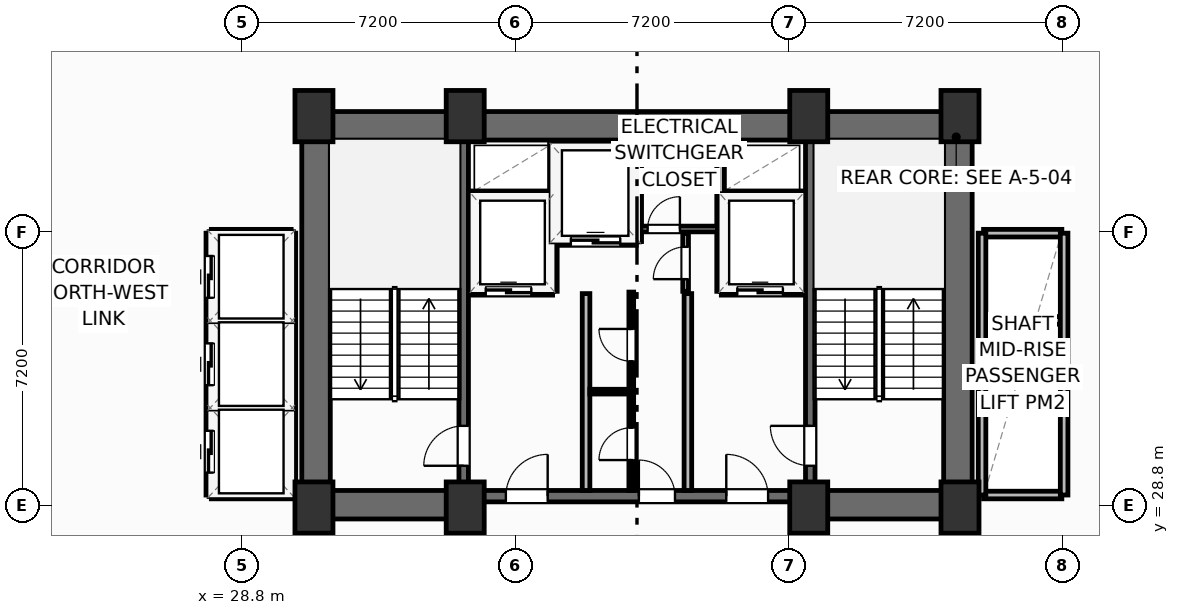
"""IFC4 building model, lengths in metres.
Left out: names, types, materials, properties, quantities, classifications, styles, units other than length and angle.
Written with IfcOpenShell. Run it as: python <this file> out.ifc"""

import sys

from ifc_helpers import new_model, si_unit, direction, frame, frame_2d, origin, origin_2d, place, context, subcontext, project, spatial, rectangle, extrude, element, fill, save


model = new_model("IFC4")
c1 = context("Model", 3, precision=1e-05, world=origin(), true_north=direction((0.0, 1.0)))
c2 = subcontext(c1, "Body", "Model", "MODEL_VIEW")
j1 = project(units=[si_unit("LENGTHUNIT", "METRE"), si_unit("PLANEANGLEUNIT", "RADIAN")], contexts=[c1])
p1 = place(None, origin())
s1 = spatial("IfcSite", under=j1, at=p1, CompositionType="ELEMENT")
p2 = place(p1, origin())
s2 = spatial("IfcBuilding", under=s1, at=p2, CompositionType="ELEMENT")
p3 = place(p2, frame((0.0, 0.0, 98.4)))
s3 = spatial("IfcBuildingStorey", under=s2, at=p3, CompositionType="ELEMENT", Elevation=98.4)
for number, where, z_axis, x_axis in (
    (1, (30.7, 28.75, 0.0), (0.0, 0.0, 1.0), (1.0, 0.0, 0.0)),
    (2, (34.68, 28.75, 0.0), (0.0, 0.0, 1.0), (1.0, 0.0, 0.0)),
    (3, (43.72, 28.75, 0.0), (0.0, 0.0, 1.0), (1.0, 0.0, 0.0)),
    (4, (47.7, 28.75, 0.0), (0.0, 0.0, 1.0), (1.0, 0.0, 0.0)),
    (5, (30.7, 39.05, 0.0), (0.0, 0.0, 1.0), (1.0, 0.0, 0.0)),
    (6, (34.68, 39.05, 0.0), (0.0, 0.0, 1.0), (1.0, 0.0, 0.0)),
    (7, (43.72, 39.05, 0.0), (0.0, 0.0, 1.0), (1.0, 0.0, 0.0)),
    (8, (47.7, 39.05, 0.0), (0.0, 0.0, 1.0), (1.0, 0.0, 0.0)),
):
    element("IfcColumn", number, at=place(p3, frame(where, z_axis=z_axis, x_axis=x_axis)), inside=s3, PredefinedType="COLUMN", context=c2, shape_type="SweptSolid", body=[
        extrude(rectangle(XDim=1.0, YDim=1.35, at=origin_2d()), origin(), (0.0, 0.0, 1.0), 3.7),
    ])
p4 = place(p3, frame((30.38, 38.795, 0.0), z_axis=(0.0, 0.0, 1.0), x_axis=(1.0, 0.0, 0.0)))
e9 = element("IfcWall", 9, at=p4, inside=s3, PredefinedType="SHEAR", context=c2, shape_type="SweptSolid", body=[
    extrude(rectangle(XDim=17.64, YDim=0.75, at=frame_2d((8.82, 0.0))), origin(), (0.0, 0.0, 1.0), 3.45),
])
for number, where, z_axis, x_axis in (
    (10, (30.755, 29.2, 0.0), (0.0, 0.0, 1.0), (0.0, 1.0, 0.0)),
    (11, (47.645, 29.2, 0.0), (0.0, 0.0, 1.0), (0.0, 1.0, 0.0)),
):
    element("IfcWall", number, at=place(p3, frame(where, z_axis=z_axis, x_axis=x_axis)), inside=s3, PredefinedType="SHEAR", context=c2, shape_type="SweptSolid", body=[
        extrude(rectangle(XDim=9.22, YDim=0.75, at=frame_2d((4.61, 0.0))), origin(), (0.0, 0.0, 1.0), 3.45),
    ])
p5 = place(p3, frame((30.38, 28.825, 0.0), z_axis=(0.0, 0.0, 1.0), x_axis=(1.0, 0.0, 0.0)))
e12 = element("IfcWall", 12, at=p5, inside=s3, PredefinedType="SHEAR", context=c2, shape_type="SweptSolid", body=[
    extrude(rectangle(XDim=4.42, YDim=0.75, at=frame_2d((2.21, 0.0))), origin(), (0.0, 0.0, 1.0), 3.45),
])
p6 = place(p3, frame((43.6, 28.825, 0.0), z_axis=(0.0, 0.0, 1.0), x_axis=(1.0, 0.0, 0.0)))
e13 = element("IfcWall", 13, at=p6, inside=s3, PredefinedType="SHEAR", context=c2, shape_type="SweptSolid", body=[
    extrude(rectangle(XDim=4.42, YDim=0.75, at=frame_2d((2.21, 0.0))), origin(), (0.0, 0.0, 1.0), 3.45),
])
p7 = place(p3, frame((34.8, 29.05, 0.0), z_axis=(0.0, 0.0, 1.0), x_axis=(1.0, 0.0, 0.0)))
e14 = element("IfcWall", 14, at=p7, inside=s3, PredefinedType="SHEAR", context=c2, shape_type="SweptSolid", body=[
    extrude(rectangle(XDim=8.8, YDim=0.3, at=frame_2d((4.4, 0.0))), origin(), (0.0, 0.0, 1.0), 3.45),
])
p8 = place(p7, frame((0.95, 0.0, 0.0)))
e15 = element("IfcOpeningElement", 15, at=p8, cuts=e14, PredefinedType="OPENING", context=c2, shape_type="SweptSolid", body=[
    extrude(rectangle(XDim=1.1, YDim=2.15, at=frame_2d((0.55, 1.075))), frame((0.0, 0.16, 0.0), z_axis=(0.0, -1.0, 0.0), x_axis=(1.0, 0.0, 0.0)), (0.0, 0.0, 1.0), 0.32),
])
p9 = place(p7, frame((6.75, 0.0, 0.0)))
e16 = element("IfcOpeningElement", 16, at=p9, cuts=e14, PredefinedType="OPENING", context=c2, shape_type="SweptSolid", body=[
    extrude(rectangle(XDim=1.1, YDim=2.15, at=frame_2d((0.55, 1.075))), frame((0.0, 0.16, 0.0), z_axis=(0.0, -1.0, 0.0), x_axis=(1.0, 0.0, 0.0)), (0.0, 0.0, 1.0), 0.32),
])
p10 = place(p7, frame((4.45, 0.0, 0.0)))
e17 = element("IfcOpeningElement", 17, at=p10, cuts=e14, PredefinedType="OPENING", context=c2, shape_type="SweptSolid", body=[
    extrude(rectangle(XDim=0.95, YDim=2.15, at=frame_2d((0.475, 1.075))), frame((0.0, 0.16, 0.0), z_axis=(0.0, -1.0, 0.0), x_axis=(1.0, 0.0, 0.0)), (0.0, 0.0, 1.0), 0.32),
])
p11 = place(p3, frame((34.64, 29.2, 0.0), z_axis=(0.0, 0.0, 1.0), x_axis=(0.0, 1.0, 0.0)))
e18 = element("IfcWall", 18, at=p11, inside=s3, PredefinedType="SHEAR", context=c2, shape_type="SweptSolid", body=[
    extrude(rectangle(XDim=9.22, YDim=0.25, at=frame_2d((4.61, 0.0))), origin(), (0.0, 0.0, 1.0), 3.45),
])
p12 = place(p11, frame((0.65, 0.0, 0.0)))
e19 = element("IfcOpeningElement", 19, at=p12, cuts=e18, PredefinedType="OPENING", context=c2, shape_type="SweptSolid", body=[
    extrude(rectangle(XDim=1.05, YDim=2.15, at=frame_2d((0.525, 1.075))), frame((0.0, 0.135, 0.0), z_axis=(0.0, -1.0, 0.0), x_axis=(1.0, 0.0, 0.0)), (0.0, 0.0, 1.0), 0.27),
])
p13 = place(p3, frame((43.76, 29.2, 0.0), z_axis=(0.0, 0.0, 1.0), x_axis=(0.0, 1.0, 0.0)))
e20 = element("IfcWall", 20, at=p13, inside=s3, PredefinedType="SHEAR", context=c2, shape_type="SweptSolid", body=[
    extrude(rectangle(XDim=9.22, YDim=0.25, at=frame_2d((4.61, 0.0))), origin(), (0.0, 0.0, 1.0), 3.45),
])
p14 = place(p13, frame((0.65, 0.0, 0.0)))
e21 = element("IfcOpeningElement", 21, at=p14, cuts=e20, PredefinedType="OPENING", context=c2, shape_type="SweptSolid", body=[
    extrude(rectangle(XDim=1.05, YDim=2.15, at=frame_2d((0.525, 1.075))), frame((0.0, 0.135, 0.0), z_axis=(0.0, -1.0, 0.0), x_axis=(1.0, 0.0, 0.0)), (0.0, 0.0, 1.0), 0.27),
])
for number, where, z_axis, x_axis in (
    (22, (37.86, 29.2, 0.0), (0.0, 0.0, 1.0), (0.0, 1.0, 0.0)),
    (23, (40.54, 29.2, 0.0), (0.0, 0.0, 1.0), (0.0, 1.0, 0.0)),
):
    element("IfcWall", number, at=place(p3, frame(where, z_axis=z_axis, x_axis=x_axis)), inside=s3, PredefinedType="PARTITIONING", context=c2, shape_type="SweptSolid", body=[
        extrude(rectangle(XDim=5.18, YDim=0.2, at=frame_2d((2.59, 0.0))), origin(), (0.0, 0.0, 1.0), 3.45),
    ])
p15 = place(p3, frame((34.8, 34.44, 0.0), z_axis=(0.0, 0.0, 1.0), x_axis=(1.0, 0.0, 0.0)))
e24 = element("IfcWall", 24, at=p15, inside=s3, PredefinedType="PARTITIONING", context=c2, shape_type="SweptSolid", body=[
    extrude(rectangle(XDim=2.18, YDim=0.2, at=frame_2d((1.09, 0.0))), origin(), (0.0, 0.0, 1.0), 3.45),
])
p16 = place(p15, frame((0.42, 0.0, 0.0)))
e25 = element("IfcOpeningElement", 25, at=p16, cuts=e24, PredefinedType="OPENING", context=c2, shape_type="SweptSolid", body=[
    extrude(rectangle(XDim=1.2, YDim=2.2, at=frame_2d((0.6, 1.1))), frame((0.0, 0.11, 0.0), z_axis=(0.0, -1.0, 0.0), x_axis=(1.0, 0.0, 0.0)), (0.0, 0.0, 1.0), 0.22),
])
p17 = place(p3, frame((34.8, 36.98, 0.0), z_axis=(0.0, 0.0, 1.0), x_axis=(1.0, 0.0, 0.0)))
e26 = element("IfcWall", 26, at=p17, inside=s3, PredefinedType="PARTITIONING", context=c2, shape_type="SweptSolid", body=[
    extrude(rectangle(XDim=2.18, YDim=0.2, at=frame_2d((1.09, 0.0))), origin(), (0.0, 0.0, 1.0), 3.45),
])
p18 = place(p3, frame((37.0, 34.44, 0.0), z_axis=(0.0, 0.0, 1.0), x_axis=(0.0, 1.0, 0.0)))
e27 = element("IfcWall", 27, at=p18, inside=s3, PredefinedType="PARTITIONING", context=c2, shape_type="SweptSolid", body=[
    extrude(rectangle(XDim=3.9, YDim=0.2, at=frame_2d((1.95, 0.0))), origin(), (0.0, 0.0, 1.0), 3.45),
])
p19 = place(p3, frame((41.42, 34.44, 0.0), z_axis=(0.0, 0.0, 1.0), x_axis=(1.0, 0.0, 0.0)))
e28 = element("IfcWall", 28, at=p19, inside=s3, PredefinedType="PARTITIONING", context=c2, shape_type="SweptSolid", body=[
    extrude(rectangle(XDim=2.18, YDim=0.2, at=frame_2d((1.09, 0.0))), origin(), (0.0, 0.0, 1.0), 3.45),
])
p20 = place(p19, frame((0.42, 0.0, 0.0)))
e29 = element("IfcOpeningElement", 29, at=p20, cuts=e28, PredefinedType="OPENING", context=c2, shape_type="SweptSolid", body=[
    extrude(rectangle(XDim=1.2, YDim=2.2, at=frame_2d((0.6, 1.1))), frame((0.0, 0.11, 0.0), z_axis=(0.0, -1.0, 0.0), x_axis=(1.0, 0.0, 0.0)), (0.0, 0.0, 1.0), 0.22),
])
p21 = place(p3, frame((41.42, 36.98, 0.0), z_axis=(0.0, 0.0, 1.0), x_axis=(1.0, 0.0, 0.0)))
e30 = element("IfcWall", 30, at=p21, inside=s3, PredefinedType="PARTITIONING", context=c2, shape_type="SweptSolid", body=[
    extrude(rectangle(XDim=2.18, YDim=0.2, at=frame_2d((1.09, 0.0))), origin(), (0.0, 0.0, 1.0), 3.45),
])
p22 = place(p3, frame((41.4, 34.44, 0.0), z_axis=(0.0, 0.0, 1.0), x_axis=(0.0, 1.0, 0.0)))
e31 = element("IfcWall", 31, at=p22, inside=s3, PredefinedType="PARTITIONING", context=c2, shape_type="SweptSolid", body=[
    extrude(rectangle(XDim=3.9, YDim=0.2, at=frame_2d((1.95, 0.0))), origin(), (0.0, 0.0, 1.0), 3.45),
])
p23 = place(p3, frame((37.06, 35.75, 0.0), z_axis=(0.0, 0.0, 1.0), x_axis=(1.0, 0.0, 0.0)))
e32 = element("IfcWall", 32, at=p23, inside=s3, PredefinedType="PARTITIONING", context=c2, shape_type="SweptSolid", body=[
    extrude(rectangle(XDim=2.12, YDim=0.2, at=frame_2d((1.06, 0.0))), origin(), (0.0, 0.0, 1.0), 3.45),
])
p24 = place(p23, frame((0.4, 0.0, 0.0)))
e33 = element("IfcOpeningElement", 33, at=p24, cuts=e32, PredefinedType="OPENING", context=c2, shape_type="SweptSolid", body=[
    extrude(rectangle(XDim=1.3, YDim=2.2, at=frame_2d((0.65, 1.1))), frame((0.0, 0.11, 0.0), z_axis=(0.0, -1.0, 0.0), x_axis=(1.0, 0.0, 0.0)), (0.0, 0.0, 1.0), 0.22),
])
p25 = place(p3, frame((39.22, 35.75, 0.0), z_axis=(0.0, 0.0, 1.0), x_axis=(0.0, 1.0, 0.0)))
e34 = element("IfcWall", 34, at=p25, inside=s3, PredefinedType="PARTITIONING", context=c2, shape_type="SweptSolid", body=[
    extrude(rectangle(XDim=2.59, YDim=0.2, at=frame_2d((1.295, 0.0))), origin(), (0.0, 0.0, 1.0), 3.45),
])
p26 = place(p3, frame((39.3, 36.08, 0.0), z_axis=(0.0, 0.0, 1.0), x_axis=(1.0, 0.0, 0.0)))
e35 = element("IfcWall", 35, at=p26, inside=s3, PredefinedType="PARTITIONING", context=c2, shape_type="SweptSolid", body=[
    extrude(rectangle(XDim=2.02, YDim=0.15, at=frame_2d((1.01, 0.0))), origin(), (0.0, 0.0, 1.0), 3.45),
])
p27 = place(p26, frame((0.18, 0.0, 0.0)))
e36 = element("IfcOpeningElement", 36, at=p27, cuts=e35, PredefinedType="OPENING", context=c2, shape_type="SweptSolid", body=[
    extrude(rectangle(XDim=0.85, YDim=2.05, at=frame_2d((0.425, 1.025))), frame((0.0, 0.085, 0.0), z_axis=(0.0, -1.0, 0.0), x_axis=(1.0, 0.0, 0.0)), (0.0, 0.0, 1.0), 0.17),
])
p28 = place(p3, frame((40.48, 34.44, 0.0), z_axis=(0.0, 0.0, 1.0), x_axis=(0.0, 1.0, 0.0)))
e37 = element("IfcWall", 37, at=p28, inside=s3, PredefinedType="PARTITIONING", context=c2, shape_type="SweptSolid", body=[
    extrude(rectangle(XDim=1.52, YDim=0.15, at=frame_2d((0.76, 0.0))), origin(), (0.0, 0.0, 1.0), 3.45),
])
p29 = place(p28, frame((0.32, 0.0, 0.0)))
e38 = element("IfcOpeningElement", 38, at=p29, cuts=e37, PredefinedType="OPENING", context=c2, shape_type="SweptSolid", body=[
    extrude(rectangle(XDim=0.85, YDim=2.05, at=frame_2d((0.425, 1.025))), frame((0.0, 0.085, 0.0), z_axis=(0.0, -1.0, 0.0), x_axis=(1.0, 0.0, 0.0)), (0.0, 0.0, 1.0), 0.17),
])
p30 = place(p3, frame((37.96, 31.8, 0.0), z_axis=(0.0, 0.0, 1.0), x_axis=(1.0, 0.0, 0.0)))
e39 = element("IfcWall", 39, at=p30, inside=s3, PredefinedType="PARTITIONING", context=c2, shape_type="SweptSolid", body=[
    extrude(rectangle(XDim=1.09, YDim=0.125, at=frame_2d((0.545, 0.0))), origin(), (0.0, 0.0, 1.0), 3.45),
])
p31 = place(p3, frame((39.05, 29.2, 0.0), z_axis=(0.0, 0.0, 1.0), x_axis=(0.0, 1.0, 0.0)))
e40 = element("IfcWall", 40, at=p31, inside=s3, PredefinedType="PARTITIONING", context=c2, shape_type="SweptSolid", body=[
    extrude(rectangle(XDim=5.22, YDim=0.125, at=frame_2d((2.61, 0.0))), origin(), (0.0, 0.0, 1.0), 3.45),
])
p32 = place(p31, frame((0.8, 0.0, 0.0)))
e41 = element("IfcOpeningElement", 41, at=p32, cuts=e40, PredefinedType="OPENING", context=c2, shape_type="SweptSolid", body=[
    extrude(rectangle(XDim=0.85, YDim=2.05, at=frame_2d((0.425, 1.025))), frame((0.0, 0.073, 0.0), z_axis=(0.0, -1.0, 0.0), x_axis=(1.0, 0.0, 0.0)), (0.0, 0.0, 1.0), 0.145),
])
p33 = place(p31, frame((3.4, 0.0, 0.0)))
e42 = element("IfcOpeningElement", 42, at=p33, cuts=e40, PredefinedType="OPENING", context=c2, shape_type="SweptSolid", body=[
    extrude(rectangle(XDim=0.85, YDim=2.05, at=frame_2d((0.425, 1.025))), frame((0.0, 0.073, 0.0), z_axis=(0.0, -1.0, 0.0), x_axis=(1.0, 0.0, 0.0)), (0.0, 0.0, 1.0), 0.145),
])
for number, where, z_axis, x_axis in (
    (43, (28.02, 31.375, 0.0), (0.0, 0.0, 1.0), (1.0, 0.0, 0.0)),
    (44, (28.02, 33.675, 0.0), (0.0, 0.0, 1.0), (1.0, 0.0, 0.0)),
):
    element("IfcWall", number, at=place(p3, frame(where, z_axis=z_axis, x_axis=x_axis)), inside=s3, PredefinedType="PARTITIONING", context=c2, shape_type="SweptSolid", body=[
        extrude(rectangle(XDim=2.06, YDim=0.2, at=frame_2d((1.03, 0.0))), origin(), (0.0, 0.0, 1.0), 3.45),
    ])
for number, where, z_axis, x_axis in (
    (45, (28.0, 29.08, 0.0), (0.0, 0.0, 1.0), (1.0, 0.0, 0.0)),
    (46, (28.0, 35.97, 0.0), (0.0, 0.0, 1.0), (1.0, 0.0, 0.0)),
):
    element("IfcWall", number, at=place(p3, frame(where, z_axis=z_axis, x_axis=x_axis)), inside=s3, PredefinedType="PARTITIONING", context=c2, shape_type="SweptSolid", body=[
        extrude(rectangle(XDim=2.1, YDim=0.2, at=frame_2d((1.05, 0.0))), origin(), (0.0, 0.0, 1.0), 3.45),
    ])
p34 = place(p3, frame((30.12, 29.08, 0.0), z_axis=(0.0, 0.0, 1.0), x_axis=(0.0, 1.0, 0.0)))
e47 = element("IfcWall", 47, at=p34, inside=s3, PredefinedType="PARTITIONING", context=c2, shape_type="SweptSolid", body=[
    extrude(rectangle(XDim=6.89, YDim=0.2, at=frame_2d((3.445, 0.0))), origin(), (0.0, 0.0, 1.0), 3.45),
])
p35 = place(p3, frame((27.96, 29.08, 0.0), z_axis=(0.0, 0.0, 1.0), x_axis=(0.0, 1.0, 0.0)))
e48 = element("IfcWall", 48, at=p35, inside=s3, PredefinedType="PARTITIONING", context=c2, shape_type="SweptSolid", body=[
    extrude(rectangle(XDim=6.89, YDim=0.2, at=frame_2d((3.445, 0.0))), origin(), (0.0, 0.0, 1.0), 3.45),
])
p36 = place(p35, frame((0.59, 0.0, 0.0)))
e49 = element("IfcOpeningElement", 49, at=p36, cuts=e48, PredefinedType="OPENING", context=c2, shape_type="SweptSolid", body=[
    extrude(rectangle(XDim=1.1, YDim=2.15, at=frame_2d((0.55, 1.075))), frame((0.0, 0.11, 0.0), z_axis=(0.0, -1.0, 0.0), x_axis=(1.0, 0.0, 0.0)), (0.0, 0.0, 1.0), 0.22),
])
p37 = place(p35, frame((2.89, 0.0, 0.0)))
e50 = element("IfcOpeningElement", 50, at=p37, cuts=e48, PredefinedType="OPENING", context=c2, shape_type="SweptSolid", body=[
    extrude(rectangle(XDim=1.1, YDim=2.15, at=frame_2d((0.55, 1.075))), frame((0.0, 0.11, 0.0), z_axis=(0.0, -1.0, 0.0), x_axis=(1.0, 0.0, 0.0)), (0.0, 0.0, 1.0), 0.22),
])
p38 = place(p35, frame((5.19, 0.0, 0.0)))
e51 = element("IfcOpeningElement", 51, at=p38, cuts=e48, PredefinedType="OPENING", context=c2, shape_type="SweptSolid", body=[
    extrude(rectangle(XDim=1.1, YDim=2.15, at=frame_2d((0.55, 1.075))), frame((0.0, 0.11, 0.0), z_axis=(0.0, -1.0, 0.0), x_axis=(1.0, 0.0, 0.0)), (0.0, 0.0, 1.0), 0.22),
])
for number, where, z_axis, x_axis in (
    (52, (48.32, 31.375, 0.0), (0.0, 0.0, 1.0), (1.0, 0.0, 0.0)),
    (53, (48.32, 33.675, 0.0), (0.0, 0.0, 1.0), (1.0, 0.0, 0.0)),
):
    element("IfcWall", number, at=place(p3, frame(where, z_axis=z_axis, x_axis=x_axis)), inside=s3, PredefinedType="PARTITIONING", context=c2, shape_type="SweptSolid", body=[
        extrude(rectangle(XDim=2.06, YDim=0.2, at=frame_2d((1.03, 0.0))), origin(), (0.0, 0.0, 1.0), 3.45),
    ])
p39 = place(p3, frame((48.32, 29.08, 0.0), z_axis=(0.0, 0.0, 1.0), x_axis=(1.0, 0.0, 0.0)))
e54 = element("IfcWall", 54, at=p39, inside=s3, PredefinedType="PARTITIONING", context=c2, shape_type="SweptSolid", body=[
    extrude(rectangle(XDim=2.06, YDim=0.2, at=frame_2d((1.03, 0.0))), origin(), (0.0, 0.0, 1.0), 2.662),
])
p40 = place(p3, frame((48.32, 35.97, 0.0), z_axis=(0.0, 0.0, 1.0), x_axis=(1.0, 0.0, 0.0)))
e55 = element("IfcWall", 55, at=p40, inside=s3, PredefinedType="PARTITIONING", context=c2, shape_type="SweptSolid", body=[
    extrude(rectangle(XDim=2.06, YDim=0.2, at=frame_2d((1.03, 0.0))), origin(), (0.0, 0.0, 1.0), 3.45),
])
for number, where, z_axis, x_axis in (
    (56, (48.28, 29.08, 0.0), (0.0, 0.0, 1.0), (0.0, 1.0, 0.0)),
    (57, (50.44, 29.08, 0.0), (0.0, 0.0, 1.0), (0.0, 1.0, 0.0)),
):
    element("IfcWall", number, at=place(p3, frame(where, z_axis=z_axis, x_axis=x_axis)), inside=s3, PredefinedType="PARTITIONING", context=c2, shape_type="SweptSolid", body=[
        extrude(rectangle(XDim=6.89, YDim=0.2, at=frame_2d((3.445, 0.0))), origin(), (0.0, 0.0, 1.0), 3.45),
    ])
p41 = place(p12, origin())
e58 = element("IfcDoor", 58, at=p41, inside=s3, OperationType="SINGLE_SWING_LEFT", PredefinedType="DOOR", context=c2, shape_type="SweptSolid", body=[
    extrude(rectangle(XDim=1.05, YDim=2.15, at=frame_2d((0.525, 1.075))), frame((0.0, 0.025, 0.0), z_axis=(0.0, -1.0, 0.0), x_axis=(1.0, 0.0, 0.0)), (0.0, 0.0, 1.0), 0.05),
])
fill(e19, e58)
p42 = place(p14, origin())
e59 = element("IfcDoor", 59, at=p42, inside=s3, OperationType="SINGLE_SWING_RIGHT", PredefinedType="DOOR", context=c2, shape_type="SweptSolid", body=[
    extrude(rectangle(XDim=1.05, YDim=2.15, at=frame_2d((0.525, 1.075))), frame((0.0, 0.025, 0.0), z_axis=(0.0, -1.0, 0.0), x_axis=(1.0, 0.0, 0.0)), (0.0, 0.0, 1.0), 0.05),
])
fill(e21, e59)
p43 = place(p8, origin())
e60 = element("IfcDoor", 60, at=p43, inside=s3, OperationType="SINGLE_SWING_RIGHT", PredefinedType="DOOR", context=c2, shape_type="SweptSolid", body=[
    extrude(rectangle(XDim=1.1, YDim=2.15, at=frame_2d((0.55, 1.075))), frame((0.0, 0.025, 0.0), z_axis=(0.0, -1.0, 0.0), x_axis=(1.0, 0.0, 0.0)), (0.0, 0.0, 1.0), 0.05),
])
fill(e15, e60)
p44 = place(p9, origin())
e61 = element("IfcDoor", 61, at=p44, inside=s3, OperationType="SINGLE_SWING_LEFT", PredefinedType="DOOR", context=c2, shape_type="SweptSolid", body=[
    extrude(rectangle(XDim=1.1, YDim=2.15, at=frame_2d((0.55, 1.075))), frame((0.0, 0.025, 0.0), z_axis=(0.0, -1.0, 0.0), x_axis=(1.0, 0.0, 0.0)), (0.0, 0.0, 1.0), 0.05),
])
fill(e16, e61)
p45 = place(p16, origin())
e62 = element("IfcDoor", 62, at=p45, inside=s3, OperationType="SLIDING_TO_LEFT", PredefinedType="DOOR", context=c2, shape_type="SweptSolid", body=[
    extrude(rectangle(XDim=1.2, YDim=2.2, at=frame_2d((0.6, 1.1))), frame((0.0, 0.025, 0.0), z_axis=(0.0, -1.0, 0.0), x_axis=(1.0, 0.0, 0.0)), (0.0, 0.0, 1.0), 0.05),
])
fill(e25, e62)
p46 = place(p20, origin())
e63 = element("IfcDoor", 63, at=p46, inside=s3, OperationType="SLIDING_TO_LEFT", PredefinedType="DOOR", context=c2, shape_type="SweptSolid", body=[
    extrude(rectangle(XDim=1.2, YDim=2.2, at=frame_2d((0.6, 1.1))), frame((0.0, 0.025, 0.0), z_axis=(0.0, -1.0, 0.0), x_axis=(1.0, 0.0, 0.0)), (0.0, 0.0, 1.0), 0.05),
])
fill(e29, e63)
p47 = place(p24, origin())
e64 = element("IfcDoor", 64, at=p47, inside=s3, OperationType="SLIDING_TO_LEFT", PredefinedType="DOOR", context=c2, shape_type="SweptSolid", body=[
    extrude(rectangle(XDim=1.3, YDim=2.2, at=frame_2d((0.65, 1.1))), frame((0.0, 0.025, 0.0), z_axis=(0.0, -1.0, 0.0), x_axis=(1.0, 0.0, 0.0)), (0.0, 0.0, 1.0), 0.05),
])
fill(e33, e64)
p48 = place(p27, origin())
e65 = element("IfcDoor", 65, at=p48, inside=s3, OperationType="SINGLE_SWING_RIGHT", PredefinedType="DOOR", context=c2, shape_type="SweptSolid", body=[
    extrude(rectangle(XDim=0.85, YDim=2.05, at=frame_2d((0.425, 1.025))), frame((0.0, 0.025, 0.0), z_axis=(0.0, -1.0, 0.0), x_axis=(1.0, 0.0, 0.0)), (0.0, 0.0, 1.0), 0.05),
])
fill(e36, e65)
p49 = place(p29, origin())
e66 = element("IfcDoor", 66, at=p49, inside=s3, OperationType="SINGLE_SWING_LEFT", PredefinedType="DOOR", context=c2, shape_type="SweptSolid", body=[
    extrude(rectangle(XDim=0.85, YDim=2.05, at=frame_2d((0.425, 1.025))), frame((0.0, 0.025, 0.0), z_axis=(0.0, -1.0, 0.0), x_axis=(1.0, 0.0, 0.0)), (0.0, 0.0, 1.0), 0.05),
])
fill(e38, e66)
p50 = place(p32, origin())
e67 = element("IfcDoor", 67, at=p50, inside=s3, OperationType="SINGLE_SWING_LEFT", PredefinedType="DOOR", context=c2, shape_type="SweptSolid", body=[
    extrude(rectangle(XDim=0.85, YDim=2.05, at=frame_2d((0.425, 1.025))), frame((0.0, 0.025, 0.0), z_axis=(0.0, -1.0, 0.0), x_axis=(1.0, 0.0, 0.0)), (0.0, 0.0, 1.0), 0.05),
])
fill(e41, e67)
p51 = place(p33, origin())
e68 = element("IfcDoor", 68, at=p51, inside=s3, OperationType="SINGLE_SWING_RIGHT", PredefinedType="DOOR", context=c2, shape_type="SweptSolid", body=[
    extrude(rectangle(XDim=0.85, YDim=2.05, at=frame_2d((0.425, 1.025))), frame((0.0, 0.025, 0.0), z_axis=(0.0, -1.0, 0.0), x_axis=(1.0, 0.0, 0.0)), (0.0, 0.0, 1.0), 0.05),
])
fill(e42, e68)
p52 = place(p10, origin())
e69 = element("IfcDoor", 69, at=p52, inside=s3, OperationType="SINGLE_SWING_LEFT", PredefinedType="DOOR", context=c2, shape_type="SweptSolid", body=[
    extrude(rectangle(XDim=0.95, YDim=2.15, at=frame_2d((0.475, 1.075))), frame((0.0, 0.025, 0.0), z_axis=(0.0, -1.0, 0.0), x_axis=(1.0, 0.0, 0.0)), (0.0, 0.0, 1.0), 0.05),
])
fill(e17, e69)
p53 = place(p36, origin())
e70 = element("IfcDoor", 70, at=p53, inside=s3, OperationType="SLIDING_TO_LEFT", PredefinedType="DOOR", context=c2, shape_type="SweptSolid", body=[
    extrude(rectangle(XDim=1.1, YDim=2.15, at=frame_2d((0.55, 1.075))), frame((0.0, 0.025, 0.0), z_axis=(0.0, -1.0, 0.0), x_axis=(1.0, 0.0, 0.0)), (0.0, 0.0, 1.0), 0.05),
])
fill(e49, e70)
p54 = place(p37, origin())
e71 = element("IfcDoor", 71, at=p54, inside=s3, OperationType="SLIDING_TO_LEFT", PredefinedType="DOOR", context=c2, shape_type="SweptSolid", body=[
    extrude(rectangle(XDim=1.1, YDim=2.15, at=frame_2d((0.55, 1.075))), frame((0.0, 0.025, 0.0), z_axis=(0.0, -1.0, 0.0), x_axis=(1.0, 0.0, 0.0)), (0.0, 0.0, 1.0), 0.05),
])
fill(e50, e71)
p55 = place(p38, origin())
e72 = element("IfcDoor", 72, at=p55, inside=s3, OperationType="SLIDING_TO_LEFT", PredefinedType="DOOR", context=c2, shape_type="SweptSolid", body=[
    extrude(rectangle(XDim=1.1, YDim=2.15, at=frame_2d((0.55, 1.075))), frame((0.0, 0.025, 0.0), z_axis=(0.0, -1.0, 0.0), x_axis=(1.0, 0.0, 0.0)), (0.0, 0.0, 1.0), 0.05),
])
fill(e51, e72)
save(model, sys.argv[1])
